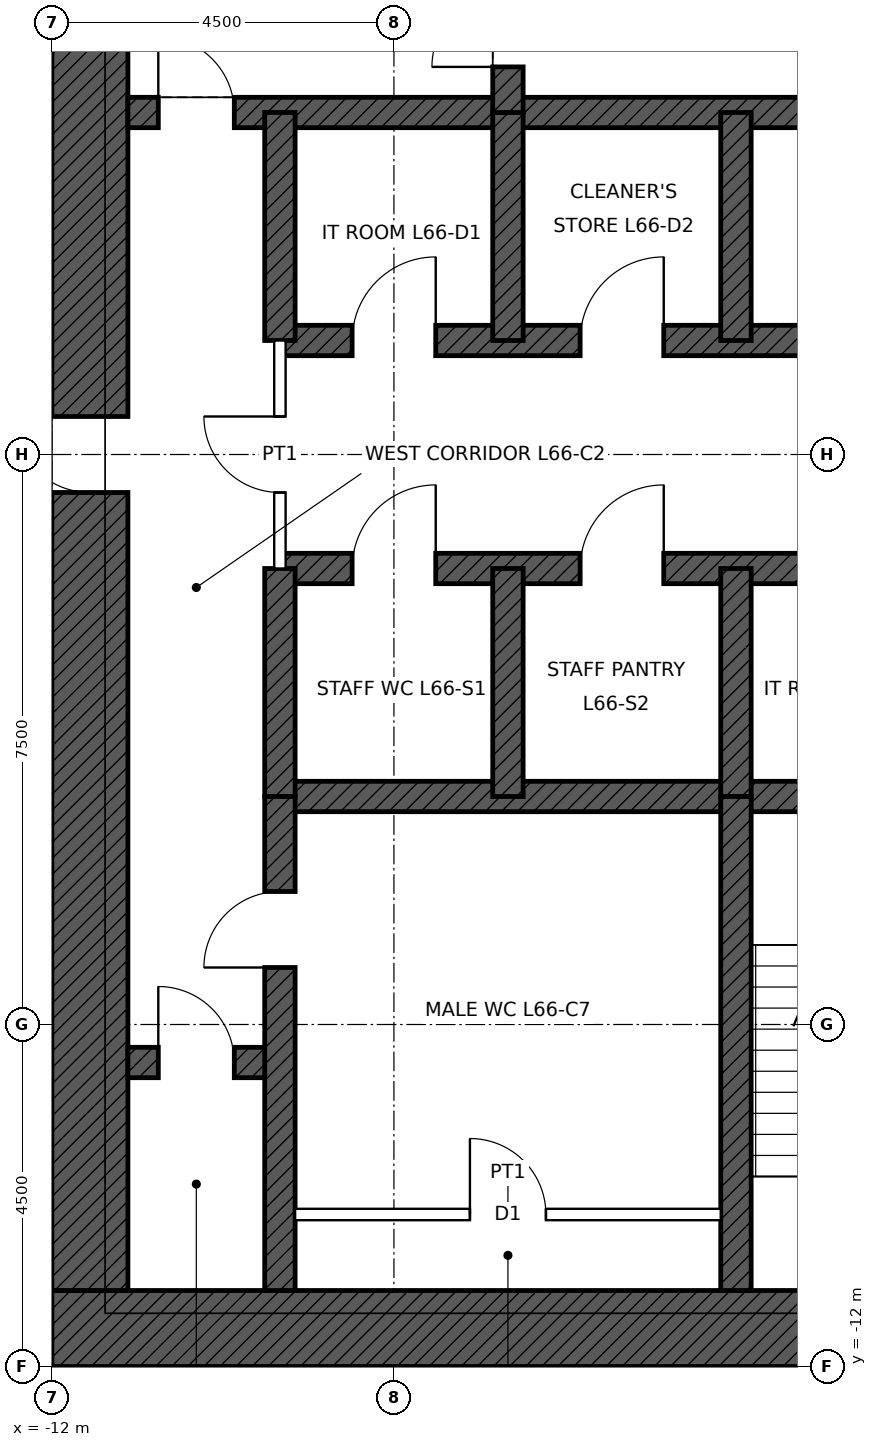
"""IFC4 building model, lengths in metres.
Left out: names, types, materials, properties, quantities, classifications, styles, units other than length and angle.
Written with IfcOpenShell. Run it as: python <this file> out.ifc"""

import sys

from ifc_helpers import new_model, si_unit, direction, frame, frame_2d, origin, place, context, subcontext, project, spatial, rectangle, extrude, element, fill, save


model = new_model("IFC4")
c1 = context("Model", 3, precision=1e-05, world=origin(), true_north=direction((0.0, 1.0)))
c2 = subcontext(c1, "Body", "Model", "MODEL_VIEW")
j1 = project(units=[si_unit("LENGTHUNIT", "METRE"), si_unit("PLANEANGLEUNIT", "RADIAN")], contexts=[c1])
p1 = place(None, origin())
s1 = spatial("IfcSite", under=j1, at=p1, CompositionType="ELEMENT")
p2 = place(p1, origin())
s2 = spatial("IfcBuilding", under=s1, at=p2, CompositionType="ELEMENT")
p3 = place(p2, frame((0.0, 0.0, 299.9)))
s3 = spatial("IfcBuildingStorey", under=s2, at=p3, CompositionType="ELEMENT", Elevation=299.9)
p4 = place(p3, frame((12.0, -11.5, 0.0), z_axis=(0.0, 0.0, 1.0), x_axis=(-1.0, 0.0, 0.0)))
e1 = element("IfcWall", 1, at=p4, inside=s3, PredefinedType="SHEAR", context=c2, shape_type="SweptSolid", body=[
    extrude(rectangle(XDim=24.0, YDim=1.0, at=frame_2d((12.0, 0.0))), origin(), (0.0, 0.0, 1.0), 4.0),
])
p5 = place(p4, frame((11.5, 0.0, 0.0)))
e2 = element("IfcOpeningElement", 2, at=p5, cuts=e1, PredefinedType="OPENING", context=c2, shape_type="SweptSolid", body=[
    extrude(rectangle(XDim=1.0, YDim=2.1, at=frame_2d((0.5, 1.05))), frame((0.0, 0.51, 0.0), z_axis=(0.0, -1.0, 0.0), x_axis=(1.0, 0.0, 0.0)), (0.0, 0.0, 1.0), 1.02),
])
p6 = place(p4, frame((1.0, 0.0, 0.0)))
e3 = element("IfcOpeningElement", 3, at=p6, cuts=e1, PredefinedType="OPENING", context=c2, shape_type="SweptSolid", body=[
    extrude(rectangle(XDim=1.0, YDim=2.4, at=frame_2d((0.5, 1.2))), frame((0.0, 0.51, 0.0), z_axis=(0.0, -1.0, 0.0), x_axis=(1.0, 0.0, 0.0)), (0.0, 0.0, 1.0), 1.02),
])
p7 = place(p3, frame((-11.5, -11.0, 0.0), z_axis=(0.0, 0.0, 1.0), x_axis=(0.0, 1.0, 0.0)))
e4 = element("IfcWall", 4, at=p7, inside=s3, PredefinedType="SHEAR", context=c2, shape_type="SweptSolid", body=[
    extrude(rectangle(XDim=22.0, YDim=1.0, at=frame_2d((11.0, 0.0))), origin(), (0.0, 0.0, 1.0), 4.0),
])
p8 = place(p7, frame((10.5, 0.0, 0.0)))
e5 = element("IfcOpeningElement", 5, at=p8, cuts=e4, PredefinedType="OPENING", context=c2, shape_type="SweptSolid", body=[
    extrude(rectangle(XDim=1.0, YDim=2.4, at=frame_2d((0.5, 1.2))), frame((0.0, 0.51, 0.0), z_axis=(0.0, -1.0, 0.0), x_axis=(1.0, 0.0, 0.0)), (0.0, 0.0, 1.0), 1.02),
])
p9 = place(p3, frame((-11.0, 4.5, 0.0), z_axis=(0.0, 0.0, 1.0), x_axis=(1.0, 0.0, 0.0)))
e6 = element("IfcWall", 6, at=p9, inside=s3, PredefinedType="SHEAR", context=c2, shape_type="SweptSolid", body=[
    extrude(rectangle(XDim=22.0, YDim=0.4, at=frame_2d((11.0, 0.0))), origin(), (0.0, 0.0, 1.0), 4.0),
])
p10 = place(p9, frame((0.4, 0.0, 0.0)))
e7 = element("IfcOpeningElement", 7, at=p10, cuts=e6, PredefinedType="OPENING", context=c2, shape_type="SweptSolid", body=[
    extrude(rectangle(XDim=1.0, YDim=2.1, at=frame_2d((0.5, 1.05))), frame((0.0, 0.21, 0.0), z_axis=(0.0, -1.0, 0.0), x_axis=(1.0, 0.0, 0.0)), (0.0, 0.0, 1.0), 0.42),
])
p11 = place(p9, frame((20.6, 0.0, 0.0)))
e8 = element("IfcOpeningElement", 8, at=p11, cuts=e6, PredefinedType="OPENING", context=c2, shape_type="SweptSolid", body=[
    extrude(rectangle(XDim=1.0, YDim=2.1, at=frame_2d((0.5, 1.05))), frame((0.0, 0.21, 0.0), z_axis=(0.0, -1.0, 0.0), x_axis=(1.0, 0.0, 0.0)), (0.0, 0.0, 1.0), 0.42),
])
p12 = place(p3, frame((-9.0, 1.5, 0.0), z_axis=(0.0, 0.0, 1.0), x_axis=(1.0, 0.0, 0.0)))
e9 = element("IfcWall", 9, at=p12, inside=s3, PredefinedType="SHEAR", context=c2, shape_type="SweptSolid", body=[
    extrude(rectangle(XDim=18.0, YDim=0.4, at=frame_2d((9.0, 0.0))), origin(), (0.0, 0.0, 1.0), 4.0),
])
p13 = place(p12, frame((0.95, 0.0, 0.0)))
e10 = element("IfcOpeningElement", 10, at=p13, cuts=e9, PredefinedType="OPENING", context=c2, shape_type="SweptSolid", body=[
    extrude(rectangle(XDim=1.1, YDim=2.1, at=frame_2d((0.55, 1.05))), frame((0.0, 0.21, 0.0), z_axis=(0.0, -1.0, 0.0), x_axis=(1.0, 0.0, 0.0)), (0.0, 0.0, 1.0), 0.42),
])
p14 = place(p12, frame((3.95, 0.0, 0.0)))
e11 = element("IfcOpeningElement", 11, at=p14, cuts=e9, PredefinedType="OPENING", context=c2, shape_type="SweptSolid", body=[
    extrude(rectangle(XDim=1.1, YDim=2.1, at=frame_2d((0.55, 1.05))), frame((0.0, 0.21, 0.0), z_axis=(0.0, -1.0, 0.0), x_axis=(1.0, 0.0, 0.0)), (0.0, 0.0, 1.0), 0.42),
])
p15 = place(p12, frame((6.95, 0.0, 0.0)))
e12 = element("IfcOpeningElement", 12, at=p15, cuts=e9, PredefinedType="OPENING", context=c2, shape_type="SweptSolid", body=[
    extrude(rectangle(XDim=1.1, YDim=2.1, at=frame_2d((0.55, 1.05))), frame((0.0, 0.21, 0.0), z_axis=(0.0, -1.0, 0.0), x_axis=(1.0, 0.0, 0.0)), (0.0, 0.0, 1.0), 0.42),
])
p16 = place(p12, frame((9.95, 0.0, 0.0)))
e13 = element("IfcOpeningElement", 13, at=p16, cuts=e9, PredefinedType="OPENING", context=c2, shape_type="SweptSolid", body=[
    extrude(rectangle(XDim=1.1, YDim=2.1, at=frame_2d((0.55, 1.05))), frame((0.0, 0.21, 0.0), z_axis=(0.0, -1.0, 0.0), x_axis=(1.0, 0.0, 0.0)), (0.0, 0.0, 1.0), 0.42),
])
p17 = place(p12, frame((12.95, 0.0, 0.0)))
e14 = element("IfcOpeningElement", 14, at=p17, cuts=e9, PredefinedType="OPENING", context=c2, shape_type="SweptSolid", body=[
    extrude(rectangle(XDim=1.1, YDim=2.1, at=frame_2d((0.55, 1.05))), frame((0.0, 0.21, 0.0), z_axis=(0.0, -1.0, 0.0), x_axis=(1.0, 0.0, 0.0)), (0.0, 0.0, 1.0), 0.42),
])
p18 = place(p12, frame((15.95, 0.0, 0.0)))
e15 = element("IfcOpeningElement", 15, at=p18, cuts=e9, PredefinedType="OPENING", context=c2, shape_type="SweptSolid", body=[
    extrude(rectangle(XDim=1.1, YDim=2.1, at=frame_2d((0.55, 1.05))), frame((0.0, 0.21, 0.0), z_axis=(0.0, -1.0, 0.0), x_axis=(1.0, 0.0, 0.0)), (0.0, 0.0, 1.0), 0.42),
])
p19 = place(p3, frame((-9.0, -1.5, 0.0), z_axis=(0.0, 0.0, 1.0), x_axis=(1.0, 0.0, 0.0)))
e16 = element("IfcWall", 16, at=p19, inside=s3, PredefinedType="SHEAR", context=c2, shape_type="SweptSolid", body=[
    extrude(rectangle(XDim=18.0, YDim=0.4, at=frame_2d((9.0, 0.0))), origin(), (0.0, 0.0, 1.0), 4.0),
])
p20 = place(p19, frame((9.95, 0.0, 0.0)))
e17 = element("IfcOpeningElement", 17, at=p20, cuts=e16, PredefinedType="OPENING", context=c2, shape_type="SweptSolid", body=[
    extrude(rectangle(XDim=1.1, YDim=2.1, at=frame_2d((0.55, 1.05))), frame((0.0, 0.21, 0.0), z_axis=(0.0, -1.0, 0.0), x_axis=(1.0, 0.0, 0.0)), (0.0, 0.0, 1.0), 0.42),
])
p21 = place(p19, frame((12.95, 0.0, 0.0)))
e18 = element("IfcOpeningElement", 18, at=p21, cuts=e16, PredefinedType="OPENING", context=c2, shape_type="SweptSolid", body=[
    extrude(rectangle(XDim=1.1, YDim=2.1, at=frame_2d((0.55, 1.05))), frame((0.0, 0.21, 0.0), z_axis=(0.0, -1.0, 0.0), x_axis=(1.0, 0.0, 0.0)), (0.0, 0.0, 1.0), 0.42),
])
p22 = place(p19, frame((15.95, 0.0, 0.0)))
e19 = element("IfcOpeningElement", 19, at=p22, cuts=e16, PredefinedType="OPENING", context=c2, shape_type="SweptSolid", body=[
    extrude(rectangle(XDim=1.1, YDim=2.1, at=frame_2d((0.55, 1.05))), frame((0.0, 0.21, 0.0), z_axis=(0.0, -1.0, 0.0), x_axis=(1.0, 0.0, 0.0)), (0.0, 0.0, 1.0), 0.42),
])
p23 = place(p19, frame((0.95, 0.0, 0.0)))
e20 = element("IfcOpeningElement", 20, at=p23, cuts=e16, PredefinedType="OPENING", context=c2, shape_type="SweptSolid", body=[
    extrude(rectangle(XDim=1.1, YDim=2.1, at=frame_2d((0.55, 1.05))), frame((0.0, 0.21, 0.0), z_axis=(0.0, -1.0, 0.0), x_axis=(1.0, 0.0, 0.0)), (0.0, 0.0, 1.0), 0.42),
])
p24 = place(p19, frame((3.95, 0.0, 0.0)))
e21 = element("IfcOpeningElement", 21, at=p24, cuts=e16, PredefinedType="OPENING", context=c2, shape_type="SweptSolid", body=[
    extrude(rectangle(XDim=1.1, YDim=2.1, at=frame_2d((0.55, 1.05))), frame((0.0, 0.21, 0.0), z_axis=(0.0, -1.0, 0.0), x_axis=(1.0, 0.0, 0.0)), (0.0, 0.0, 1.0), 0.42),
])
p25 = place(p19, frame((6.95, 0.0, 0.0)))
e22 = element("IfcOpeningElement", 22, at=p25, cuts=e16, PredefinedType="OPENING", context=c2, shape_type="SweptSolid", body=[
    extrude(rectangle(XDim=1.1, YDim=2.1, at=frame_2d((0.55, 1.05))), frame((0.0, 0.21, 0.0), z_axis=(0.0, -1.0, 0.0), x_axis=(1.0, 0.0, 0.0)), (0.0, 0.0, 1.0), 0.42),
])
p26 = place(p3, frame((-9.0, -4.5, 0.0), z_axis=(0.0, 0.0, 1.0), x_axis=(1.0, 0.0, 0.0)))
e23 = element("IfcWall", 23, at=p26, inside=s3, PredefinedType="SHEAR", context=c2, shape_type="SweptSolid", body=[
    extrude(rectangle(XDim=18.0, YDim=0.4, at=frame_2d((9.0, 0.0))), origin(), (0.0, 0.0, 1.0), 4.0),
])
p27 = place(p3, frame((-11.0, -8.0, 0.0), z_axis=(0.0, 0.0, 1.0), x_axis=(1.0, 0.0, 0.0)))
e24 = element("IfcWall", 24, at=p27, inside=s3, PredefinedType="SHEAR", context=c2, shape_type="SweptSolid", body=[
    extrude(rectangle(XDim=2.0, YDim=0.4, at=frame_2d((1.0, 0.0))), origin(), (0.0, 0.0, 1.0), 4.0),
])
p28 = place(p27, frame((0.4, 0.0, 0.0)))
e25 = element("IfcOpeningElement", 25, at=p28, cuts=e24, PredefinedType="OPENING", context=c2, shape_type="SweptSolid", body=[
    extrude(rectangle(XDim=1.0, YDim=2.1, at=frame_2d((0.5, 1.05))), frame((0.0, 0.21, 0.0), z_axis=(0.0, -1.0, 0.0), x_axis=(1.0, 0.0, 0.0)), (0.0, 0.0, 1.0), 0.42),
])
for number, where, z_axis, x_axis in (
    (26, (-9.0, 1.5, 0.0), (0.0, 0.0, 1.0), (0.0, 1.0, 0.0)),
    (27, (-9.0, -4.5, 0.0), (0.0, 0.0, 1.0), (0.0, 1.0, 0.0)),
    (28, (-6.0, 1.5, 0.0), (0.0, 0.0, 1.0), (0.0, 1.0, 0.0)),
    (29, (-3.0, 1.5, 0.0), (0.0, 0.0, 1.0), (0.0, 1.0, 0.0)),
    (30, (-6.0, -4.5, 0.0), (0.0, 0.0, 1.0), (0.0, 1.0, 0.0)),
    (31, (-3.0, -4.5, 0.0), (0.0, 0.0, 1.0), (0.0, 1.0, 0.0)),
):
    element("IfcWall", number, at=place(p3, frame(where, z_axis=z_axis, x_axis=x_axis)), inside=s3, PredefinedType="SHEAR", context=c2, shape_type="SweptSolid", body=[
        extrude(rectangle(XDim=3.0, YDim=0.4, at=frame_2d((1.5, 0.0))), origin(), (0.0, 0.0, 1.0), 4.0),
    ])
p29 = place(p3, frame((-6.0, 4.5, 0.0), z_axis=(0.0, 0.0, 1.0), x_axis=(0.0, 1.0, 0.0)))
e32 = element("IfcWall", 32, at=p29, inside=s3, PredefinedType="SHEAR", context=c2, shape_type="SweptSolid", body=[
    extrude(rectangle(XDim=6.5, YDim=0.4, at=frame_2d((3.25, 0.0))), origin(), (0.0, 0.0, 1.0), 4.0),
])
p30 = place(p29, frame((0.6, 0.0, 0.0)))
e33 = element("IfcOpeningElement", 33, at=p30, cuts=e32, PredefinedType="OPENING", context=c2, shape_type="SweptSolid", body=[
    extrude(rectangle(XDim=1.0, YDim=2.1, at=frame_2d((0.5, 1.05))), frame((0.0, 0.21, 0.0), z_axis=(0.0, -1.0, 0.0), x_axis=(1.0, 0.0, 0.0)), (0.0, 0.0, 1.0), 0.42),
])
p31 = place(p3, frame((-9.0, -11.0, 0.0), z_axis=(0.0, 0.0, 1.0), x_axis=(0.0, 1.0, 0.0)))
e34 = element("IfcWall", 34, at=p31, inside=s3, PredefinedType="SHEAR", context=c2, shape_type="SweptSolid", body=[
    extrude(rectangle(XDim=6.5, YDim=0.4, at=frame_2d((3.25, 0.0))), origin(), (0.0, 0.0, 1.0), 4.0),
])
p32 = place(p31, frame((4.25, 0.0, 0.0)))
e35 = element("IfcOpeningElement", 35, at=p32, cuts=e34, PredefinedType="OPENING", context=c2, shape_type="SweptSolid", body=[
    extrude(rectangle(XDim=1.0, YDim=2.1, at=frame_2d((0.5, 1.05))), frame((0.0, 0.21, 0.0), z_axis=(0.0, -1.0, 0.0), x_axis=(1.0, 0.0, 0.0)), (0.0, 0.0, 1.0), 0.42),
])
p33 = place(p3, frame((-3.0, -11.0, 0.0), z_axis=(0.0, 0.0, 1.0), x_axis=(0.0, 1.0, 0.0)))
e36 = element("IfcWall", 36, at=p33, inside=s3, PredefinedType="SHEAR", context=c2, shape_type="SweptSolid", body=[
    extrude(rectangle(XDim=6.5, YDim=0.4, at=frame_2d((3.25, 0.0))), origin(), (0.0, 0.0, 1.0), 4.0),
])
p34 = place(p3, frame((-8.8, -10.0, 0.0), z_axis=(0.0, 0.0, 1.0), x_axis=(1.0, 0.0, 0.0)))
e37 = element("IfcWall", 37, at=p34, inside=s3, PredefinedType="PARTITIONING", context=c2, shape_type="SweptSolid", body=[
    extrude(rectangle(XDim=5.6, YDim=0.15, at=frame_2d((2.8, 0.0))), origin(), (0.0, 0.0, 1.0), 3.75),
])
p35 = place(p34, frame((2.3, 0.0, 0.0)))
e38 = element("IfcOpeningElement", 38, at=p35, cuts=e37, PredefinedType="OPENING", context=c2, shape_type="SweptSolid", body=[
    extrude(rectangle(XDim=1.0, YDim=2.1, at=frame_2d((0.5, 1.05))), frame((0.0, 0.085, 0.0), z_axis=(0.0, -1.0, 0.0), x_axis=(1.0, 0.0, 0.0)), (0.0, 0.0, 1.0), 0.17),
])
p36 = place(p3, frame((-9.0, -1.5, 0.0), z_axis=(0.0, 0.0, 1.0), x_axis=(0.0, 1.0, 0.0)))
e39 = element("IfcWall", 39, at=p36, inside=s3, PredefinedType="PARTITIONING", context=c2, shape_type="SweptSolid", body=[
    extrude(rectangle(XDim=3.0, YDim=0.15, at=frame_2d((1.5, 0.0))), origin(), (0.0, 0.0, 1.0), 3.75),
])
p37 = place(p36, frame((1.0, 0.0, 0.0)))
e40 = element("IfcOpeningElement", 40, at=p37, cuts=e39, PredefinedType="OPENING", context=c2, shape_type="SweptSolid", body=[
    extrude(rectangle(XDim=1.0, YDim=2.4, at=frame_2d((0.5, 1.2))), frame((0.0, 0.085, 0.0), z_axis=(0.0, -1.0, 0.0), x_axis=(1.0, 0.0, 0.0)), (0.0, 0.0, 1.0), 0.17),
])
p38 = place(p10, origin())
e41 = element("IfcDoor", 41, at=p38, inside=s3, OperationType="SINGLE_SWING_LEFT", PredefinedType="DOOR", context=c2, shape_type="SweptSolid", body=[
    extrude(rectangle(XDim=1.0, YDim=2.1, at=frame_2d((0.5, 1.05))), frame((0.0, 0.025, 0.0), z_axis=(0.0, -1.0, 0.0), x_axis=(1.0, 0.0, 0.0)), (0.0, 0.0, 1.0), 0.05),
])
fill(e7, e41)
p39 = place(p30, origin())
e42 = element("IfcDoor", 42, at=p39, inside=s3, OperationType="SINGLE_SWING_LEFT", PredefinedType="DOOR", context=c2, shape_type="SweptSolid", body=[
    extrude(rectangle(XDim=1.0, YDim=2.1, at=frame_2d((0.5, 1.05))), frame((0.0, 0.025, 0.0), z_axis=(0.0, -1.0, 0.0), x_axis=(1.0, 0.0, 0.0)), (0.0, 0.0, 1.0), 0.05),
])
fill(e33, e42)
p40 = place(p8, origin())
e43 = element("IfcDoor", 43, at=p40, inside=s3, OperationType="SINGLE_SWING_RIGHT", PredefinedType="DOOR", context=c2, shape_type="SweptSolid", body=[
    extrude(rectangle(XDim=1.0, YDim=2.4, at=frame_2d((0.5, 1.2))), frame((0.0, 0.485, 0.0), z_axis=(0.0, -1.0, 0.0), x_axis=(1.0, 0.0, 0.0)), (0.0, 0.0, 1.0), 0.05),
])
fill(e5, e43)
p41 = place(p32, origin())
e44 = element("IfcDoor", 44, at=p41, inside=s3, OperationType="SINGLE_SWING_LEFT", PredefinedType="DOOR", context=c2, shape_type="SweptSolid", body=[
    extrude(rectangle(XDim=1.0, YDim=2.1, at=frame_2d((0.5, 1.05))), frame((0.0, 0.025, 0.0), z_axis=(0.0, -1.0, 0.0), x_axis=(1.0, 0.0, 0.0)), (0.0, 0.0, 1.0), 0.05),
])
fill(e35, e44)
p42 = place(p28, origin())
e45 = element("IfcDoor", 45, at=p42, inside=s3, OperationType="SINGLE_SWING_LEFT", PredefinedType="DOOR", context=c2, shape_type="SweptSolid", body=[
    extrude(rectangle(XDim=1.0, YDim=2.1, at=frame_2d((0.5, 1.05))), frame((0.0, 0.025, 0.0), z_axis=(0.0, -1.0, 0.0), x_axis=(1.0, 0.0, 0.0)), (0.0, 0.0, 1.0), 0.05),
])
fill(e25, e45)
p43 = place(p35, origin())
e46 = element("IfcDoor", 46, at=p43, inside=s3, OperationType="SINGLE_SWING_LEFT", PredefinedType="DOOR", context=c2, shape_type="SweptSolid", body=[
    extrude(rectangle(XDim=1.0, YDim=2.1, at=frame_2d((0.5, 1.05))), frame((0.0, 0.025, 0.0), z_axis=(0.0, -1.0, 0.0), x_axis=(1.0, 0.0, 0.0)), (0.0, 0.0, 1.0), 0.05),
])
fill(e38, e46)
p44 = place(p37, origin())
e47 = element("IfcDoor", 47, at=p44, inside=s3, OperationType="SINGLE_SWING_RIGHT", PredefinedType="DOOR", context=c2, shape_type="SweptSolid", body=[
    extrude(rectangle(XDim=1.0, YDim=2.4, at=frame_2d((0.5, 1.2))), frame((0.0, 0.025, 0.0), z_axis=(0.0, -1.0, 0.0), x_axis=(1.0, 0.0, 0.0)), (0.0, 0.0, 1.0), 0.05),
])
fill(e40, e47)
p45 = place(p13, origin())
e48 = element("IfcDoor", 48, at=p45, inside=s3, OperationType="SINGLE_SWING_RIGHT", PredefinedType="DOOR", context=c2, shape_type="SweptSolid", body=[
    extrude(rectangle(XDim=1.1, YDim=2.1, at=frame_2d((0.55, 1.05))), frame((0.0, 0.025, 0.0), z_axis=(0.0, -1.0, 0.0), x_axis=(1.0, 0.0, 0.0)), (0.0, 0.0, 1.0), 0.05),
])
fill(e10, e48)
p46 = place(p14, origin())
e49 = element("IfcDoor", 49, at=p46, inside=s3, OperationType="SINGLE_SWING_RIGHT", PredefinedType="DOOR", context=c2, shape_type="SweptSolid", body=[
    extrude(rectangle(XDim=1.1, YDim=2.1, at=frame_2d((0.55, 1.05))), frame((0.0, 0.025, 0.0), z_axis=(0.0, -1.0, 0.0), x_axis=(1.0, 0.0, 0.0)), (0.0, 0.0, 1.0), 0.05),
])
fill(e11, e49)
p47 = place(p23, origin())
e50 = element("IfcDoor", 50, at=p47, inside=s3, OperationType="SINGLE_SWING_RIGHT", PredefinedType="DOOR", context=c2, shape_type="SweptSolid", body=[
    extrude(rectangle(XDim=1.1, YDim=2.1, at=frame_2d((0.55, 1.05))), frame((0.0, 0.025, 0.0), z_axis=(0.0, -1.0, 0.0), x_axis=(1.0, 0.0, 0.0)), (0.0, 0.0, 1.0), 0.05),
])
fill(e20, e50)
p48 = place(p24, origin())
e51 = element("IfcDoor", 51, at=p48, inside=s3, OperationType="SINGLE_SWING_RIGHT", PredefinedType="DOOR", context=c2, shape_type="SweptSolid", body=[
    extrude(rectangle(XDim=1.1, YDim=2.1, at=frame_2d((0.55, 1.05))), frame((0.0, 0.025, 0.0), z_axis=(0.0, -1.0, 0.0), x_axis=(1.0, 0.0, 0.0)), (0.0, 0.0, 1.0), 0.05),
])
fill(e21, e51)
save(model, sys.argv[1])
